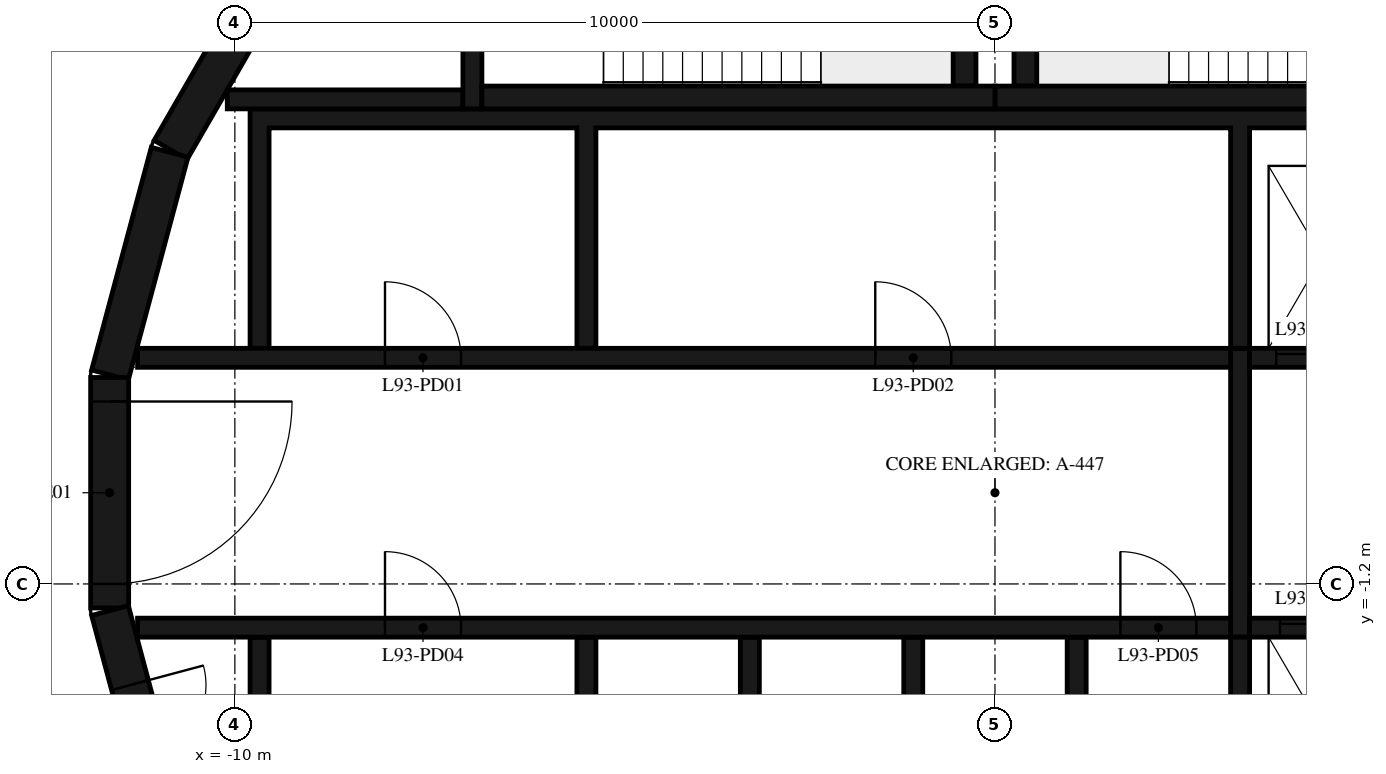
"""IFC4 building model, lengths in metres.
Left out: names, types, materials, properties, quantities, classifications, styles, units other than length and angle.
Written with IfcOpenShell. Run it as: python <this file> out.ifc"""

import sys

from ifc_helpers import new_model, si_unit, direction, frame, frame_2d, origin, place, context, subcontext, project, spatial, polyline, rectangle, outline, extrude, element, fill, save


model = new_model("IFC4")
c1 = context("Model", 3, precision=1e-05, world=origin(), true_north=direction((0.0, 1.0)))
c2 = subcontext(c1, "Body", "Model", "MODEL_VIEW")
j1 = project(units=[si_unit("LENGTHUNIT", "METRE"), si_unit("PLANEANGLEUNIT", "RADIAN")], contexts=[c1])
p1 = place(None, origin())
s1 = spatial("IfcSite", under=j1, at=p1, CompositionType="ELEMENT")
p2 = place(p1, origin())
s2 = spatial("IfcBuilding", under=s1, at=p2, CompositionType="ELEMENT")
p3 = place(p2, frame((0.0, 0.0, 361.0)))
s3 = spatial("IfcBuildingStorey", under=s2, at=p3, CompositionType="ELEMENT", Elevation=361.0)
for number, where, z_axis, x_axis in (
    (1, (-9.329, 7.137, 0.0), (0.0, 0.0, 1.0), (-0.5, -0.866, 0.0)),
    (2, (-10.858, 4.479, 0.0), (0.0, 0.0, 1.0), (-0.259, -0.966, 0.0)),
):
    element("IfcWall", number, at=place(p3, frame(where, z_axis=z_axis, x_axis=x_axis)), inside=s3, PredefinedType="SHEAR", context=c2, shape_type="SweptSolid", body=[
        extrude(rectangle(XDim=3.033, YDim=0.5, at=frame_2d((1.516, 0.0))), origin(), (0.0, 0.0, 1.0), 4.82),
    ])
p4 = place(p3, frame((-11.647, 1.516, 0.0), z_axis=(0.0, 0.0, 1.0), x_axis=(0.0, -1.0, 0.0)))
e3 = element("IfcWall", 3, at=p4, inside=s3, PredefinedType="SHEAR", context=c2, shape_type="SweptSolid", body=[
    extrude(rectangle(XDim=3.033, YDim=0.5, at=frame_2d((1.516, 0.0))), origin(), (0.0, 0.0, 1.0), 4.82),
])
p5 = place(p4, frame((0.316, 0.0, 0.0)))
e4 = element("IfcOpeningElement", 4, at=p5, cuts=e3, PredefinedType="OPENING", context=c2, shape_type="SweptSolid", body=[
    extrude(rectangle(XDim=2.4, YDim=2.1, at=frame_2d((1.2, 1.05))), frame((0.0, 0.26, 0.0), z_axis=(0.0, -1.0, 0.0), x_axis=(1.0, 0.0, 0.0)), (0.0, 0.0, 1.0), 0.52),
])
p6 = place(p3, frame((-11.643, -1.55, 0.0), z_axis=(0.0, 0.0, 1.0), x_axis=(0.258734743916, -0.965948410781, 0.0)))
e5 = element("IfcWall", 5, at=p6, inside=s3, PredefinedType="SHEAR", context=c2, shape_type="SweptSolid", body=[
    extrude(rectangle(XDim=3.033, YDim=0.5, at=frame_2d((1.516, 0.0))), origin(), (0.0, 0.0, 1.0), 4.82),
])
p7 = place(p6, frame((1.016, 0.0, 0.0)))
e6 = element("IfcOpeningElement", 6, at=p7, cuts=e5, PredefinedType="OPENING", context=c2, shape_type="SweptSolid", body=[
    extrude(rectangle(XDim=1.0, YDim=2.4, at=frame_2d((0.5, 1.2))), frame((0.0, 0.26, 0.0), z_axis=(0.0, -1.0, 0.0), x_axis=(1.0, 0.0, 0.0)), (0.0, 0.0, 1.0), 0.52),
])
p8 = place(p3, frame((0.0, 5.2, 0.0), z_axis=(0.0, 0.0, 1.0), x_axis=(1.0, 0.0, 0.0)))
e7 = element("IfcWall", 7, at=p8, inside=s3, PredefinedType="SHEAR", context=c2, shape_type="SweptSolid", body=[
    extrude(rectangle(XDim=6.75, YDim=0.3, at=frame_2d((3.375, 0.0))), origin(), (0.0, 0.0, 1.0), 4.82),
])
p9 = place(p3, frame((0.4, 5.35, 0.0), z_axis=(0.0, 0.0, 1.0), x_axis=(0.0, 1.0, 0.0)))
e8 = element("IfcWall", 8, at=p9, inside=s3, PredefinedType="SHEAR", context=c2, shape_type="SweptSolid", body=[
    extrude(rectangle(XDim=3.32, YDim=0.3, at=frame_2d((1.66, 0.0))), origin(), (0.0, 0.0, 1.0), 4.82),
])
p10 = place(p3, frame((-6.75, 5.2, 0.0), z_axis=(0.0, 0.0, 1.0), x_axis=(1.0, 0.0, 0.0)))
e9 = element("IfcWall", 9, at=p10, inside=s3, PredefinedType="SHEAR", context=c2, shape_type="SweptSolid", body=[
    extrude(rectangle(XDim=6.75, YDim=0.3, at=frame_2d((3.375, 0.0))), origin(), (0.0, 0.0, 1.0), 4.82),
])
p11 = place(p3, frame((-0.4, 5.35, 0.0), z_axis=(0.0, 0.0, 1.0), x_axis=(0.0, 1.0, 0.0)))
e10 = element("IfcWall", 10, at=p11, inside=s3, PredefinedType="SHEAR", context=c2, shape_type="SweptSolid", body=[
    extrude(rectangle(XDim=3.32, YDim=0.3, at=frame_2d((1.66, 0.0))), origin(), (0.0, 0.0, 1.0), 4.82),
])
p12 = place(p3, frame((-6.875, 8.97, 0.0), z_axis=(0.0, 0.0, 1.0), x_axis=(0.0, -1.0, 0.0)))
e11 = element("IfcWall", 11, at=p12, inside=s3, PredefinedType="SHEAR", context=c2, shape_type="SweptSolid", body=[
    extrude(rectangle(XDim=3.92, YDim=0.25, at=frame_2d((1.96, 0.0))), origin(), (0.0, 0.0, 1.0), 4.82),
])
p13 = place(p12, frame((1.61, 0.0, 0.0)))
e12 = element("IfcOpeningElement", 12, at=p13, cuts=e11, PredefinedType="OPENING", context=c2, shape_type="SweptSolid", body=[
    extrude(rectangle(XDim=1.2, YDim=2.1, at=frame_2d((0.6, 1.05))), frame((0.0, 0.135, 0.0), z_axis=(0.0, -1.0, 0.0), x_axis=(1.0, 0.0, 0.0)), (0.0, 0.0, 1.0), 0.27),
])
p14 = place(p3, frame((-7.0, 5.175, 0.0), z_axis=(0.0, 0.0, 1.0), x_axis=(-1.0, 0.0, 0.0)))
e13 = element("IfcWall", 13, at=p14, inside=s3, PredefinedType="SHEAR", context=c2, shape_type="SweptSolid", body=[
    extrude(rectangle(XDim=3.1, YDim=0.25, at=frame_2d((1.55, 0.0))), origin(), (0.0, 0.0, 1.0), 4.82),
])
p15 = place(p3, origin())
e14 = element("IfcWall", 14, at=p15, inside=s3, PredefinedType="SHEAR", context=c2, shape_type="SweptSolid", body=[
    extrude(outline(polyline([(-9.8, 1.9), (-9.55, 1.9), (-9.55, 4.8), (-5.5, 4.8), (-5.5, 1.9), (-5.25, 1.9), (-5.25, 4.8), (3.1, 4.8), (3.1, 1.9), (3.35, 1.9), (3.35, 4.8), (5.25, 4.8), (5.25, 1.9), (5.5, 1.9), (5.5, 4.8), (7.4, 4.8), (7.4, 1.9), (7.65, 1.9), (7.65, 4.8), (9.55, 4.8), (9.55, 1.9), (9.8, 1.9), (9.8, 4.8), (9.8, 5.05), (-9.8, 5.05), (-9.8, 4.8), (-9.8, 1.9)])), origin(), (0.0, 0.0, 1.0), 4.82),
])
p16 = place(p3, origin())
e15 = element("IfcWall", 15, at=p16, inside=s3, PredefinedType="SHEAR", context=c2, shape_type="SweptSolid", body=[
    extrude(outline(polyline([(9.8, -5.05), (9.8, -4.8), (9.8, -1.9), (9.55, -1.9), (9.55, -4.8), (7.65, -4.8), (7.65, -1.9), (7.4, -1.9), (7.4, -4.8), (5.5, -4.8), (5.5, -1.9), (5.25, -1.9), (5.25, -4.8), (3.35, -4.8), (3.35, -1.9), (3.1, -1.9), (3.1, -4.8), (1.2, -4.8), (1.2, -1.9), (0.95, -1.9), (0.95, -4.8), (-0.95, -4.8), (-0.95, -1.9), (-1.2, -1.9), (-1.2, -4.8), (-3.1, -4.8), (-3.1, -1.9), (-3.35, -1.9), (-3.35, -4.8), (-5.25, -4.8), (-5.25, -1.9), (-5.5, -1.9), (-5.5, -4.8), (-9.55, -4.8), (-9.55, -1.9), (-9.8, -1.9), (-9.8, -4.8), (-9.8, -5.05), (9.8, -5.05)])), origin(), (0.0, 0.0, 1.0), 4.82),
])
p17 = place(p3, frame((-11.28, 1.775, 0.0), z_axis=(0.0, 0.0, 1.0), x_axis=(1.0, 0.0, 0.0)))
e16 = element("IfcWall", 16, at=p17, inside=s3, PredefinedType="SHEAR", context=c2, shape_type="SweptSolid", body=[
    extrude(rectangle(XDim=14.38, YDim=0.25, at=frame_2d((7.19, 0.0))), origin(), (0.0, 0.0, 1.0), 4.82),
])
p18 = place(p17, frame((3.255, 0.0, 0.0)))
e17 = element("IfcOpeningElement", 17, at=p18, cuts=e16, PredefinedType="OPENING", context=c2, shape_type="SweptSolid", body=[
    extrude(rectangle(XDim=1.0, YDim=2.4, at=frame_2d((0.5, 1.2))), frame((0.0, 0.135, 0.0), z_axis=(0.0, -1.0, 0.0), x_axis=(1.0, 0.0, 0.0)), (0.0, 0.0, 1.0), 0.27),
])
p19 = place(p17, frame((9.705, 0.0, 0.0)))
e18 = element("IfcOpeningElement", 18, at=p19, cuts=e16, PredefinedType="OPENING", context=c2, shape_type="SweptSolid", body=[
    extrude(rectangle(XDim=1.0, YDim=2.4, at=frame_2d((0.5, 1.2))), frame((0.0, 0.135, 0.0), z_axis=(0.0, -1.0, 0.0), x_axis=(1.0, 0.0, 0.0)), (0.0, 0.0, 1.0), 0.27),
])
p20 = place(p3, frame((3.35, 1.775, 0.0), z_axis=(0.0, 0.0, 1.0), x_axis=(1.0, 0.0, 0.0)))
e19 = element("IfcWall", 19, at=p20, inside=s3, PredefinedType="SHEAR", context=c2, shape_type="SweptSolid", body=[
    extrude(rectangle(XDim=7.93, YDim=0.25, at=frame_2d((3.965, 0.0))), origin(), (0.0, 0.0, 1.0), 4.82),
])
p21 = place(p20, frame((0.35, 0.0, 0.0)))
e20 = element("IfcOpeningElement", 20, at=p21, cuts=e19, PredefinedType="OPENING", context=c2, shape_type="SweptSolid", body=[
    extrude(rectangle(XDim=1.2, YDim=2.4, at=frame_2d((0.6, 1.2))), frame((0.0, 0.135, 0.0), z_axis=(0.0, -1.0, 0.0), x_axis=(1.0, 0.0, 0.0)), (0.0, 0.0, 1.0), 0.27),
])
p22 = place(p20, frame((2.5, 0.0, 0.0)))
e21 = element("IfcOpeningElement", 21, at=p22, cuts=e19, PredefinedType="OPENING", context=c2, shape_type="SweptSolid", body=[
    extrude(rectangle(XDim=1.2, YDim=2.4, at=frame_2d((0.6, 1.2))), frame((0.0, 0.135, 0.0), z_axis=(0.0, -1.0, 0.0), x_axis=(1.0, 0.0, 0.0)), (0.0, 0.0, 1.0), 0.27),
])
p23 = place(p20, frame((4.75, 0.0, 0.0)))
e22 = element("IfcOpeningElement", 22, at=p23, cuts=e19, PredefinedType="OPENING", context=c2, shape_type="SweptSolid", body=[
    extrude(rectangle(XDim=1.0, YDim=2.4, at=frame_2d((0.5, 1.2))), frame((0.0, 0.135, 0.0), z_axis=(0.0, -1.0, 0.0), x_axis=(1.0, 0.0, 0.0)), (0.0, 0.0, 1.0), 0.27),
])
p24 = place(p3, frame((-11.28, -1.775, 0.0), z_axis=(0.0, 0.0, 1.0), x_axis=(1.0, 0.0, 0.0)))
e23 = element("IfcWall", 23, at=p24, inside=s3, PredefinedType="SHEAR", context=c2, shape_type="SweptSolid", body=[
    extrude(rectangle(XDim=14.38, YDim=0.25, at=frame_2d((7.19, 0.0))), origin(), (0.0, 0.0, 1.0), 4.82),
])
p25 = place(p24, frame((3.255, 0.0, 0.0)))
e24 = element("IfcOpeningElement", 24, at=p25, cuts=e23, PredefinedType="OPENING", context=c2, shape_type="SweptSolid", body=[
    extrude(rectangle(XDim=1.0, YDim=2.4, at=frame_2d((0.5, 1.2))), frame((0.0, 0.135, 0.0), z_axis=(0.0, -1.0, 0.0), x_axis=(1.0, 0.0, 0.0)), (0.0, 0.0, 1.0), 0.27),
])
p26 = place(p24, frame((12.93, 0.0, 0.0)))
e25 = element("IfcOpeningElement", 25, at=p26, cuts=e23, PredefinedType="OPENING", context=c2, shape_type="SweptSolid", body=[
    extrude(rectangle(XDim=1.0, YDim=2.4, at=frame_2d((0.5, 1.2))), frame((0.0, 0.135, 0.0), z_axis=(0.0, -1.0, 0.0), x_axis=(1.0, 0.0, 0.0)), (0.0, 0.0, 1.0), 0.27),
])
p27 = place(p3, frame((3.35, -1.775, 0.0), z_axis=(0.0, 0.0, 1.0), x_axis=(1.0, 0.0, 0.0)))
e26 = element("IfcWall", 26, at=p27, inside=s3, PredefinedType="SHEAR", context=c2, shape_type="SweptSolid", body=[
    extrude(rectangle(XDim=7.93, YDim=0.25, at=frame_2d((3.965, 0.0))), origin(), (0.0, 0.0, 1.0), 4.82),
])
p28 = place(p27, frame((0.4, 0.0, 0.0)))
e27 = element("IfcOpeningElement", 27, at=p28, cuts=e26, PredefinedType="OPENING", context=c2, shape_type="SweptSolid", body=[
    extrude(rectangle(XDim=1.1, YDim=2.4, at=frame_2d((0.55, 1.2))), frame((0.0, 0.135, 0.0), z_axis=(0.0, -1.0, 0.0), x_axis=(1.0, 0.0, 0.0)), (0.0, 0.0, 1.0), 0.27),
])
p29 = place(p27, frame((2.55, 0.0, 0.0)))
e28 = element("IfcOpeningElement", 28, at=p29, cuts=e26, PredefinedType="OPENING", context=c2, shape_type="SweptSolid", body=[
    extrude(rectangle(XDim=1.1, YDim=2.4, at=frame_2d((0.55, 1.2))), frame((0.0, 0.135, 0.0), z_axis=(0.0, -1.0, 0.0), x_axis=(1.0, 0.0, 0.0)), (0.0, 0.0, 1.0), 0.27),
])
p30 = place(p27, frame((4.7, 0.0, 0.0)))
e29 = element("IfcOpeningElement", 29, at=p30, cuts=e26, PredefinedType="OPENING", context=c2, shape_type="SweptSolid", body=[
    extrude(rectangle(XDim=1.1, YDim=2.4, at=frame_2d((0.55, 1.2))), frame((0.0, 0.135, 0.0), z_axis=(0.0, -1.0, 0.0), x_axis=(1.0, 0.0, 0.0)), (0.0, 0.0, 1.0), 0.27),
])
p31 = place(p3, frame((3.225, -1.9, 0.0), z_axis=(0.0, 0.0, 1.0), x_axis=(0.0, 1.0, 0.0)))
e30 = element("IfcWall", 30, at=p31, inside=s3, PredefinedType="SHEAR", context=c2, shape_type="SweptSolid", body=[
    extrude(rectangle(XDim=3.8, YDim=0.25, at=frame_2d((1.9, 0.0))), origin(), (0.0, 0.0, 1.0), 4.82),
])
p32 = place(p5, origin())
e31 = element("IfcDoor", 31, at=p32, inside=s3, OperationType="DOUBLE_DOOR_SINGLE_SWING", PredefinedType="DOOR", context=c2, shape_type="SweptSolid", body=[
    extrude(rectangle(XDim=2.4, YDim=2.1, at=frame_2d((1.2, 1.05))), frame((0.0, 0.025, 0.0), z_axis=(0.0, -1.0, 0.0), x_axis=(1.0, 0.0, 0.0)), (0.0, 0.0, 1.0), 0.05),
])
fill(e4, e31)
p33 = place(p21, origin())
e32 = element("IfcDoor", 32, at=p33, inside=s3, OperationType="DOUBLE_DOOR_SLIDING", PredefinedType="DOOR", context=c2, shape_type="SweptSolid", body=[
    extrude(rectangle(XDim=1.2, YDim=2.4, at=frame_2d((0.6, 1.2))), frame((0.0, 0.025, 0.0), z_axis=(0.0, -1.0, 0.0), x_axis=(1.0, 0.0, 0.0)), (0.0, 0.0, 1.0), 0.05),
])
fill(e20, e32)
p34 = place(p28, origin())
e33 = element("IfcDoor", 33, at=p34, inside=s3, OperationType="DOUBLE_DOOR_SLIDING", PredefinedType="DOOR", context=c2, shape_type="SweptSolid", body=[
    extrude(rectangle(XDim=1.1, YDim=2.4, at=frame_2d((0.55, 1.2))), frame((0.0, 0.025, 0.0), z_axis=(0.0, -1.0, 0.0), x_axis=(1.0, 0.0, 0.0)), (0.0, 0.0, 1.0), 0.05),
])
fill(e27, e33)
p35 = place(p18, origin())
e34 = element("IfcDoor", 34, at=p35, inside=s3, OperationType="SINGLE_SWING_RIGHT", PredefinedType="DOOR", context=c2, shape_type="SweptSolid", body=[
    extrude(rectangle(XDim=1.0, YDim=2.4, at=frame_2d((0.5, 1.2))), frame((0.0, 0.025, 0.0), z_axis=(0.0, -1.0, 0.0), x_axis=(1.0, 0.0, 0.0)), (0.0, 0.0, 1.0), 0.05),
])
fill(e17, e34)
p36 = place(p19, origin())
e35 = element("IfcDoor", 35, at=p36, inside=s3, OperationType="SINGLE_SWING_LEFT", PredefinedType="DOOR", context=c2, shape_type="SweptSolid", body=[
    extrude(rectangle(XDim=1.0, YDim=2.4, at=frame_2d((0.5, 1.2))), frame((0.0, 0.025, 0.0), z_axis=(0.0, -1.0, 0.0), x_axis=(1.0, 0.0, 0.0)), (0.0, 0.0, 1.0), 0.05),
])
fill(e18, e35)
p37 = place(p25, origin())
e36 = element("IfcDoor", 36, at=p37, inside=s3, OperationType="SINGLE_SWING_LEFT", PredefinedType="DOOR", context=c2, shape_type="SweptSolid", body=[
    extrude(rectangle(XDim=1.0, YDim=2.4, at=frame_2d((0.5, 1.2))), frame((0.0, 0.025, 0.0), z_axis=(0.0, -1.0, 0.0), x_axis=(1.0, 0.0, 0.0)), (0.0, 0.0, 1.0), 0.05),
])
fill(e24, e36)
p38 = place(p26, origin())
e37 = element("IfcDoor", 37, at=p38, inside=s3, OperationType="SINGLE_SWING_RIGHT", PredefinedType="DOOR", context=c2, shape_type="SweptSolid", body=[
    extrude(rectangle(XDim=1.0, YDim=2.4, at=frame_2d((0.5, 1.2))), frame((0.0, 0.025, 0.0), z_axis=(0.0, -1.0, 0.0), x_axis=(1.0, 0.0, 0.0)), (0.0, 0.0, 1.0), 0.05),
])
fill(e25, e37)
p39 = place(p7, origin())
e38 = element("IfcDoor", 38, at=p39, inside=s3, OperationType="SINGLE_SWING_LEFT", PredefinedType="DOOR", context=c2, shape_type="SweptSolid", body=[
    extrude(rectangle(XDim=1.0, YDim=2.4, at=frame_2d((0.5, 1.2))), frame((0.0, 0.025, 0.0), z_axis=(0.0, -1.0, 0.0), x_axis=(1.0, 0.0, 0.0)), (0.0, 0.0, 1.0), 0.05),
])
fill(e6, e38)
save(model, sys.argv[1])
